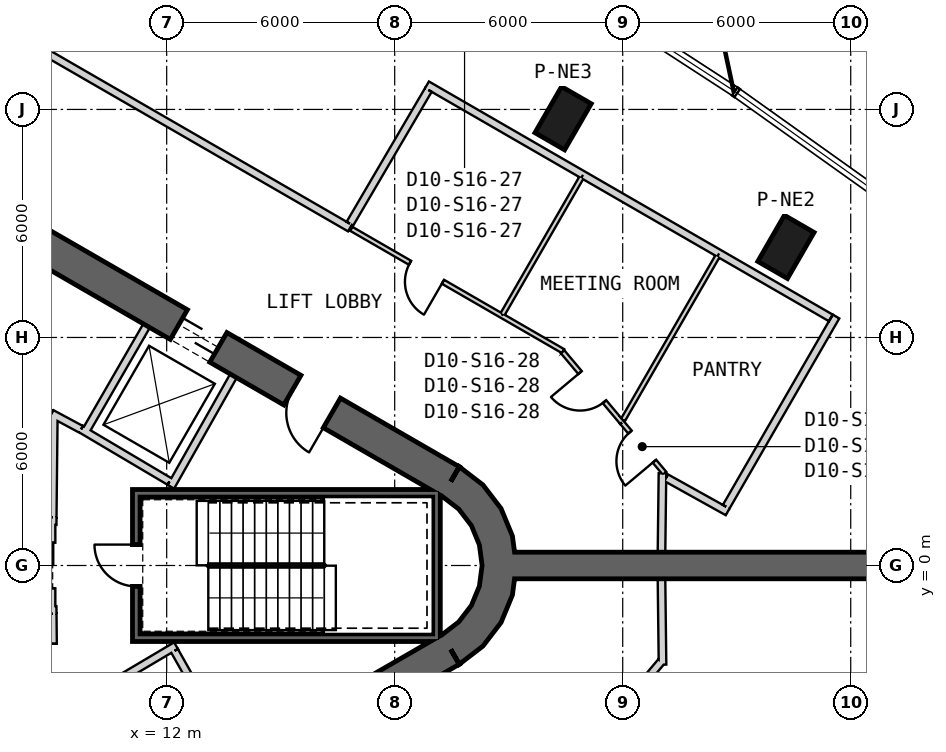
"""IFC4 building model, lengths in metres.
Left out: names, types, materials, properties, quantities, classifications, styles, units other than length and angle.
Written with IfcOpenShell. Run it as: python <this file> out.ifc"""

import sys

from ifc_helpers import new_model, si_unit, direction, frame, frame_2d, origin, origin_2d, place, context, subcontext, project, spatial, polyline, rectangle, outline, extrude, element, fill, save


model = new_model("IFC4")
c1 = context("Model", 3, precision=1e-05, world=origin(), true_north=direction((0.0, 1.0)))
c2 = subcontext(c1, "Body", "Model", "MODEL_VIEW")
j1 = project(units=[si_unit("LENGTHUNIT", "METRE"), si_unit("PLANEANGLEUNIT", "RADIAN")], contexts=[c1])
p1 = place(None, origin())
s1 = spatial("IfcSite", under=j1, at=p1, CompositionType="ELEMENT")
p2 = place(p1, origin())
s2 = spatial("IfcBuilding", under=s1, at=p2, CompositionType="ELEMENT")
p3 = place(p2, frame((0.0, 0.0, 253.2)))
s3 = spatial("IfcBuildingStorey", under=s2, at=p3, CompositionType="ELEMENT", Elevation=253.2)
for number, where, z_axis, x_axis in (
    (1, (28.295, 8.383, 0.0), (0.0, 0.0, 1.0), (0.5, 0.866, 0.0)),
    (2, (22.431, 11.768, 0.0), (0.0, 0.0, 1.0), (0.5, 0.866, 0.0)),
):
    element("IfcColumn", number, at=place(p3, frame(where, z_axis=z_axis, x_axis=x_axis)), inside=s3, PredefinedType="COLUMN", context=c2, shape_type="SweptSolid", body=[
        extrude(rectangle(XDim=1.4, YDim=0.9, at=origin_2d()), origin(), (0.0, 0.0, 1.0), 4.0),
    ])
p4 = place(p3, frame((19.475, 2.208, 0.0), z_axis=(0.0, 0.0, 1.0), x_axis=(-0.866028369851, 0.499994862586, 0.0)))
e3 = element("IfcWall", 3, at=p4, inside=s3, PredefinedType="SHEAR", context=c2, shape_type="SweptSolid", body=[
    extrude(rectangle(XDim=31.523, YDim=0.9, at=frame_2d((15.762, 0.0))), origin(), (0.0, 0.0, 1.0), 4.0),
])
p5 = place(p4, frame((7.062, 0.0, 0.0)))
e4 = element("IfcOpeningElement", 4, at=p5, cuts=e3, PredefinedType="OPENING", context=c2, shape_type="SweptSolid", body=[
    extrude(rectangle(XDim=1.2, YDim=2.4, at=frame_2d((0.6, 1.2))), frame((0.0, 0.46, 0.0), z_axis=(0.0, -1.0, 0.0), x_axis=(1.0, 0.0, 0.0)), (0.0, 0.0, 1.0), 0.92),
])
p6 = place(p4, frame((3.612, 0.0, 0.0)))
e5 = element("IfcOpeningElement", 5, at=p6, cuts=e3, PredefinedType="OPENING", context=c2, shape_type="SweptSolid", body=[
    extrude(rectangle(XDim=1.2, YDim=2.4, at=frame_2d((0.6, 1.2))), frame((0.0, 0.46, 0.0), z_axis=(0.0, -1.0, 0.0), x_axis=(1.0, 0.0, 0.0)), (0.0, 0.0, 1.0), 0.92),
])
p7 = place(p4, frame((26.712, 0.0, 0.0)))
e6 = element("IfcOpeningElement", 6, at=p7, cuts=e3, PredefinedType="OPENING", context=c2, shape_type="SweptSolid", body=[
    extrude(rectangle(XDim=1.2, YDim=2.4, at=frame_2d((0.6, 1.2))), frame((0.0, 0.46, 0.0), z_axis=(0.0, -1.0, 0.0), x_axis=(1.0, 0.0, 0.0)), (0.0, 0.0, 1.0), 0.92),
])
p8 = place(p3, frame((-7.825, -17.97, 0.0), z_axis=(0.0, 0.0, 1.0), x_axis=(0.866028369851, 0.499994862586, 0.0)))
e7 = element("IfcWall", 7, at=p8, inside=s3, PredefinedType="SHEAR", context=c2, shape_type="SweptSolid", body=[
    extrude(rectangle(XDim=31.523, YDim=0.9, at=frame_2d((15.762, 0.0))), origin(), (0.0, 0.0, 1.0), 4.0),
])
p9 = place(p8, frame((7.062, 0.0, 0.0)))
e8 = element("IfcOpeningElement", 8, at=p9, cuts=e7, PredefinedType="OPENING", context=c2, shape_type="SweptSolid", body=[
    extrude(rectangle(XDim=1.2, YDim=2.4, at=frame_2d((0.6, 1.2))), frame((0.0, 0.46, 0.0), z_axis=(0.0, -1.0, 0.0), x_axis=(1.0, 0.0, 0.0)), (0.0, 0.0, 1.0), 0.92),
])
p10 = place(p8, frame((9.762, 0.0, 0.0)))
e9 = element("IfcOpeningElement", 9, at=p10, cuts=e7, PredefinedType="OPENING", context=c2, shape_type="SweptSolid", body=[
    extrude(rectangle(XDim=1.2, YDim=2.4, at=frame_2d((0.6, 1.2))), frame((0.0, 0.46, 0.0), z_axis=(0.0, -1.0, 0.0), x_axis=(1.0, 0.0, 0.0)), (0.0, 0.0, 1.0), 0.92),
])
p11 = place(p8, frame((12.462, 0.0, 0.0)))
e10 = element("IfcOpeningElement", 10, at=p11, cuts=e7, PredefinedType="OPENING", context=c2, shape_type="SweptSolid", body=[
    extrude(rectangle(XDim=1.2, YDim=2.4, at=frame_2d((0.6, 1.2))), frame((0.0, 0.46, 0.0), z_axis=(0.0, -1.0, 0.0), x_axis=(1.0, 0.0, 0.0)), (0.0, 0.0, 1.0), 0.92),
])
p12 = place(p8, frame((15.162, 0.0, 0.0)))
e11 = element("IfcOpeningElement", 11, at=p12, cuts=e7, PredefinedType="OPENING", context=c2, shape_type="SweptSolid", body=[
    extrude(rectangle(XDim=1.2, YDim=2.4, at=frame_2d((0.6, 1.2))), frame((0.0, 0.46, 0.0), z_axis=(0.0, -1.0, 0.0), x_axis=(1.0, 0.0, 0.0)), (0.0, 0.0, 1.0), 0.92),
])
p13 = place(p8, frame((17.862, 0.0, 0.0)))
e12 = element("IfcOpeningElement", 12, at=p13, cuts=e7, PredefinedType="OPENING", context=c2, shape_type="SweptSolid", body=[
    extrude(rectangle(XDim=1.2, YDim=2.4, at=frame_2d((0.6, 1.2))), frame((0.0, 0.46, 0.0), z_axis=(0.0, -1.0, 0.0), x_axis=(1.0, 0.0, 0.0)), (0.0, 0.0, 1.0), 0.92),
])
p14 = place(p8, frame((20.562, 0.0, 0.0)))
e13 = element("IfcOpeningElement", 13, at=p14, cuts=e7, PredefinedType="OPENING", context=c2, shape_type="SweptSolid", body=[
    extrude(rectangle(XDim=1.2, YDim=2.4, at=frame_2d((0.6, 1.2))), frame((0.0, 0.46, 0.0), z_axis=(0.0, -1.0, 0.0), x_axis=(1.0, 0.0, 0.0)), (0.0, 0.0, 1.0), 0.92),
])
p15 = place(p8, frame((26.712, 0.0, 0.0)))
e14 = element("IfcOpeningElement", 14, at=p15, cuts=e7, PredefinedType="OPENING", context=c2, shape_type="SweptSolid", body=[
    extrude(rectangle(XDim=1.2, YDim=2.4, at=frame_2d((0.6, 1.2))), frame((0.0, 0.46, 0.0), z_axis=(0.0, -1.0, 0.0), x_axis=(1.0, 0.0, 0.0)), (0.0, 0.0, 1.0), 0.92),
])
p16 = place(p8, frame((3.612, 0.0, 0.0)))
e15 = element("IfcOpeningElement", 15, at=p16, cuts=e7, PredefinedType="OPENING", context=c2, shape_type="SweptSolid", body=[
    extrude(rectangle(XDim=1.2, YDim=2.4, at=frame_2d((0.6, 1.2))), frame((0.0, 0.46, 0.0), z_axis=(0.0, -1.0, 0.0), x_axis=(1.0, 0.0, 0.0)), (0.0, 0.0, 1.0), 0.92),
])
p17 = place(p3, origin())
e16 = element("IfcWall", 16, at=p17, inside=s3, PredefinedType="SHEAR", context=c2, shape_type="SweptSolid", body=[
    extrude(outline(polyline([(19.7, -2.598), (20.321, -2.121), (20.798, -1.5), (21.098, -0.777), (21.2, 0.0), (21.098, 0.777), (20.798, 1.5), (20.321, 2.121), (19.7, 2.598), (19.25, 1.819), (19.685, 1.485), (20.019, 1.05), (20.229, 0.543), (20.3, 0.0), (20.229, -0.543), (20.019, -1.05), (19.685, -1.485), (19.25, -1.819), (19.7, -2.598)])), origin(), (0.0, 0.0, 1.0), 4.0),
])
p18 = place(p3, frame((21.15, 0.0, 0.0), z_axis=(0.0, 0.0, 1.0), x_axis=(1.0, 0.0, 0.0)))
e17 = element("IfcWall", 17, at=p18, inside=s3, PredefinedType="SHEAR", context=c2, shape_type="SweptSolid", body=[
    extrude(rectangle(XDim=10.433, YDim=0.7, at=frame_2d((5.216, 0.0))), origin(), (0.0, 0.0, 1.0), 4.0),
])
p19 = place(p3, frame((9.847, 3.495, 0.0), z_axis=(0.0, 0.0, 1.0), x_axis=(0.499984717929, 0.866034226713, 0.0)))
e18 = element("IfcWall", 18, at=p19, inside=s3, PredefinedType="PLUMBINGWALL", context=c2, shape_type="SweptSolid", body=[
    extrude(rectangle(XDim=3.25, YDim=0.2, at=frame_2d((1.625, 0.0))), origin(), (0.0, 0.0, 1.0), 3.7),
])
p20 = place(p3, frame((12.11, 2.073, 0.0), z_axis=(0.0, 0.0, 1.0), x_axis=(0.49196600604, 0.870614408852, 0.0)))
e19 = element("IfcWall", 19, at=p20, inside=s3, PredefinedType="PLUMBINGWALL", context=c2, shape_type="SweptSolid", body=[
    extrude(rectangle(XDim=3.35, YDim=0.2, at=frame_2d((1.675, 0.0))), origin(), (0.0, 0.0, 1.0), 3.7),
])
p21 = place(p3, frame((12.073, 2.211, 0.0), z_axis=(0.0, 0.0, 1.0), x_axis=(-0.860414880418, 0.509594185166, 0.0)))
e20 = element("IfcWall", 20, at=p21, inside=s3, PredefinedType="PLUMBINGWALL", context=c2, shape_type="SweptSolid", body=[
    extrude(rectangle(XDim=2.7, YDim=0.2, at=frame_2d((1.35, 0.0))), origin(), (0.0, 0.0, 1.0), 3.7),
])
p22 = place(p3, frame((19.2, 1.9, -0.3), z_axis=(0.0, 0.0, 1.0), x_axis=(-1.0, 0.0, 0.0)))
e21 = element("IfcWall", 21, at=p22, inside=s3, PredefinedType="SHEAR", context=c2, shape_type="SweptSolid", body=[
    extrude(rectangle(XDim=8.1, YDim=0.2, at=frame_2d((4.05, 0.0))), origin(), (0.0, 0.0, 1.0), 4.0),
])
p23 = place(p3, frame((19.1, -2.0, -0.3), z_axis=(0.0, 0.0, 1.0), x_axis=(0.0, 1.0, 0.0)))
e22 = element("IfcWall", 22, at=p23, inside=s3, PredefinedType="SHEAR", context=c2, shape_type="SweptSolid", body=[
    extrude(rectangle(XDim=3.8, YDim=0.2, at=frame_2d((1.9, 0.0))), origin(), (0.0, 0.0, 1.0), 4.0),
])
p24 = place(p3, frame((11.1, -1.9, -0.3), z_axis=(0.0, 0.0, 1.0), x_axis=(1.0, 0.0, 0.0)))
e23 = element("IfcWall", 23, at=p24, inside=s3, PredefinedType="SHEAR", context=c2, shape_type="SweptSolid", body=[
    extrude(rectangle(XDim=7.9, YDim=0.2, at=frame_2d((3.95, 0.0))), origin(), (0.0, 0.0, 1.0), 4.0),
])
p25 = place(p3, frame((11.2, -1.8, -0.3), z_axis=(0.0, 0.0, 1.0), x_axis=(0.0, 1.0, 0.0)))
e24 = element("IfcWall", 24, at=p25, inside=s3, PredefinedType="SHEAR", context=c2, shape_type="SweptSolid", body=[
    extrude(rectangle(XDim=3.6, YDim=0.2, at=frame_2d((1.8, 0.0))), origin(), (0.0, 0.0, 1.0), 4.0),
])
p26 = place(p25, frame((1.25, 0.0, 0.3)))
e25 = element("IfcOpeningElement", 25, at=p26, cuts=e24, PredefinedType="OPENING", context=c2, shape_type="SweptSolid", body=[
    extrude(rectangle(XDim=1.1, YDim=2.1, at=frame_2d((0.55, 1.05))), frame((0.0, 0.11, 0.0), z_axis=(0.0, -1.0, 0.0), x_axis=(1.0, 0.0, 0.0)), (0.0, 0.0, 1.0), 0.22),
])
p27 = place(p3, frame((8.97, 1.2, 0.0), z_axis=(0.0, 0.0, 1.0), x_axis=(0.0, -1.0, 0.0)))
e26 = element("IfcWall", 26, at=p27, inside=s3, PredefinedType="PLUMBINGWALL", context=c2, shape_type="SweptSolid", body=[
    extrude(rectangle(XDim=2.4, YDim=0.2, at=frame_2d((1.2, 0.0))), origin(), (0.0, 0.0, 1.0), 3.7),
])
p28 = place(p27, frame((0.6, 0.0, 0.0)))
e27 = element("IfcOpeningElement", 27, at=p28, cuts=e26, PredefinedType="OPENING", context=c2, shape_type="SweptSolid", body=[
    extrude(rectangle(XDim=1.2, YDim=2.4, at=frame_2d((0.6, 1.2))), frame((0.0, 0.11, 0.0), z_axis=(0.0, -1.0, 0.0), x_axis=(1.0, 0.0, 0.0)), (0.0, 0.0, 1.0), 0.22),
])
p29 = place(p3, frame((6.0, 1.2, 0.0), z_axis=(0.0, 0.0, 1.0), x_axis=(0.999949988, -0.010001074852, 0.0)))
e28 = element("IfcWall", 28, at=p29, inside=s3, PredefinedType="PLUMBINGWALL", context=c2, shape_type="SweptSolid", body=[
    extrude(rectangle(XDim=3.1, YDim=0.2, at=frame_2d((1.55, 0.0))), origin(), (0.0, 0.0, 1.0), 3.7),
])
p30 = place(p3, frame((5.9, -1.201, 0.0), z_axis=(0.0, 0.0, 1.0), x_axis=(0.999950064753, 0.009993397809, 0.0)))
e29 = element("IfcWall", 29, at=p30, inside=s3, PredefinedType="PLUMBINGWALL", context=c2, shape_type="SweptSolid", body=[
    extrude(rectangle(XDim=3.2, YDim=0.2, at=frame_2d((1.6, 0.0))), origin(), (0.0, 0.0, 1.0), 3.7),
])
p31 = place(p3, frame((8.974, 3.999, 0.0), z_axis=(0.0, 0.0, 1.0), x_axis=(0.880917147855, -0.473270513147, 0.0)))
e30 = element("IfcWall", 30, at=p31, inside=s3, PredefinedType="PARTITIONING", context=c2, shape_type="SweptSolid", body=[
    extrude(rectangle(XDim=0.878, YDim=0.2, at=frame_2d((0.439, 0.0))), origin(), (0.0, 0.0, 1.0), 3.7),
])
p32 = place(p3, frame((12.245, -2.109, 0.0), z_axis=(0.0, 0.0, 1.0), x_axis=(-0.860414880418, -0.509594185166, 0.0)))
e31 = element("IfcWall", 31, at=p32, inside=s3, PredefinedType="PARTITIONING", context=c2, shape_type="SweptSolid", body=[
    extrude(rectangle(XDim=2.7, YDim=0.2, at=frame_2d((1.35, 0.0))), origin(), (0.0, 0.0, 1.0), 3.7),
])
p33 = place(p3, frame((13.758, -4.99, 0.0), z_axis=(0.0, 0.0, 1.0), x_axis=(-0.491993409184, 0.87059892334, 0.0)))
e32 = element("IfcWall", 32, at=p33, inside=s3, PredefinedType="PARTITIONING", context=c2, shape_type="SweptSolid", body=[
    extrude(rectangle(XDim=3.15, YDim=0.2, at=frame_2d((1.575, 0.0))), origin(), (0.0, 0.0, 1.0), 3.7),
])
p34 = place(p33, frame((1.175, 0.0, 0.0)))
e33 = element("IfcOpeningElement", 33, at=p34, cuts=e32, PredefinedType="OPENING", context=c2, shape_type="SweptSolid", body=[
    extrude(rectangle(XDim=0.8, YDim=2.1, at=frame_2d((0.4, 1.05))), frame((0.0, 0.11, 0.0), z_axis=(0.0, -1.0, 0.0), x_axis=(1.0, 0.0, 0.0)), (0.0, 0.0, 1.0), 0.22),
])
p35 = place(p3, frame((9.001, 1.27, 0.0), z_axis=(0.0, 0.0, 1.0), x_axis=(0.01074821465, 0.999942236273, 0.0)))
e34 = element("IfcWall", 34, at=p35, inside=s3, PredefinedType="PARTITIONING", context=c2, shape_type="SweptSolid", body=[
    extrude(rectangle(XDim=2.726, YDim=0.2, at=frame_2d((1.363, 0.0))), origin(), (0.0, 0.0, 1.0), 3.7),
])
p36 = place(p3, frame((9.029, -3.851, 0.0), z_axis=(0.0, 0.0, 1.0), x_axis=(-0.010783593937, 0.99994185536, 0.0)))
e35 = element("IfcWall", 35, at=p36, inside=s3, PredefinedType="PARTITIONING", context=c2, shape_type="SweptSolid", body=[
    extrude(rectangle(XDim=2.581, YDim=0.2, at=frame_2d((1.291, 0.0))), origin(), (0.0, 0.0, 1.0), 3.7),
])
p37 = place(p36, frame((0.791, 0.0, 0.0)))
e36 = element("IfcOpeningElement", 36, at=p37, cuts=e35, PredefinedType="OPENING", context=c2, shape_type="SweptSolid", body=[
    extrude(rectangle(XDim=1.0, YDim=2.1, at=frame_2d((0.5, 1.05))), frame((0.0, 0.11, 0.0), z_axis=(0.0, -1.0, 0.0), x_axis=(1.0, 0.0, 0.0)), (0.0, 0.0, 1.0), 0.22),
])
p38 = place(p3, frame((22.431, 5.64, 0.0), z_axis=(0.0, 0.0, 1.0), x_axis=(-0.866019968675, 0.500009413767, 0.0)))
e37 = element("IfcWall", 37, at=p38, inside=s3, PredefinedType="PARTITIONING", context=c2, shape_type="SweptSolid", body=[
    extrude(rectangle(XDim=1.866, YDim=0.12, at=frame_2d((0.933, 0.0))), origin(), (0.0, 0.0, 1.0), 2.98),
])
p39 = place(p3, frame((20.816, 6.573, 0.0), z_axis=(0.0, 0.0, 1.0), x_axis=(-0.866038816861, 0.499976767151, 0.0)))
e38 = element("IfcWall", 38, at=p39, inside=s3, PredefinedType="PARTITIONING", context=c2, shape_type="SweptSolid", body=[
    extrude(rectangle(XDim=4.571, YDim=0.12, at=frame_2d((2.285, 0.0))), origin(), (0.0, 0.0, 1.0), 2.98),
])
p40 = place(p39, frame((1.785, 0.0, 0.0)))
e39 = element("IfcOpeningElement", 39, at=p40, cuts=e38, PredefinedType="OPENING", context=c2, shape_type="SweptSolid", body=[
    extrude(rectangle(XDim=1.0, YDim=2.1, at=frame_2d((0.5, 1.05))), frame((0.0, 0.07, 0.0), z_axis=(0.0, -1.0, 0.0), x_axis=(1.0, 0.0, 0.0)), (0.0, 0.0, 1.0), 0.14),
])
p41 = place(p3, frame((16.823, 8.878, 0.0), z_axis=(0.0, 0.0, 1.0), x_axis=(-0.866020355572, 0.500008743658, 0.0)))
e40 = element("IfcWall", 40, at=p41, inside=s3, PredefinedType="PARTITIONING", context=c2, shape_type="SweptSolid", body=[
    extrude(rectangle(XDim=12.18, YDim=0.2, at=frame_2d((6.09, 0.0))), origin(), (0.0, 0.0, 1.0), 2.98),
])
p42 = place(p3, frame((25.021, 0.35, 0.0), z_axis=(0.0, 0.0, 1.0), x_axis=(0.012334587904, 0.999923926077, 0.0)))
e41 = element("IfcWall", 41, at=p42, inside=s3, PredefinedType="PARTITIONING", context=c2, shape_type="SweptSolid", body=[
    extrude(rectangle(XDim=2.078, YDim=0.2, at=frame_2d((1.039, 0.0))), origin(), (0.0, 0.0, 1.0), 3.7),
])
p43 = place(p3, frame((25.1, 2.427, 0.0), z_axis=(0.0, 0.0, 1.0), x_axis=(-0.642728930344, 0.766093677104, 0.0)))
e42 = element("IfcWall", 42, at=p43, inside=s3, PredefinedType="PARTITIONING", context=c2, shape_type="SweptSolid", body=[
    extrude(rectangle(XDim=1.743, YDim=0.12, at=frame_2d((0.872, 0.0))), origin(), (0.0, 0.0, 1.0), 2.88),
])
p44 = place(p43, frame((0.414, 0.0, 0.0)))
e43 = element("IfcOpeningElement", 43, at=p44, cuts=e42, PredefinedType="OPENING", context=c2, shape_type="SweptSolid", body=[
    extrude(rectangle(XDim=1.0, YDim=2.1, at=frame_2d((0.5, 1.05))), frame((0.0, 0.07, 0.0), z_axis=(0.0, -1.0, 0.0), x_axis=(1.0, 0.0, 0.0)), (0.0, 0.0, 1.0), 0.14),
])
p45 = place(p3, frame((23.979, 3.763, 0.0), z_axis=(0.0, 0.0, 1.0), x_axis=(-0.642800687269, 0.766033469535, 0.0)))
e44 = element("IfcWall", 44, at=p45, inside=s3, PredefinedType="PARTITIONING", context=c2, shape_type="SweptSolid", body=[
    extrude(rectangle(XDim=2.429, YDim=0.12, at=frame_2d((1.214, 0.0))), origin(), (0.0, 0.0, 1.0), 3.7),
])
p46 = place(p45, frame((0.715, 0.0, 0.0)))
e45 = element("IfcOpeningElement", 45, at=p46, cuts=e44, PredefinedType="OPENING", context=c2, shape_type="SweptSolid", body=[
    extrude(rectangle(XDim=1.0, YDim=2.1, at=frame_2d((0.5, 1.05))), frame((0.0, 0.07, 0.0), z_axis=(0.0, -1.0, 0.0), x_axis=(1.0, 0.0, 0.0)), (0.0, 0.0, 1.0), 0.14),
])
p47 = place(p3, frame((25.048, -2.608, 0.0), z_axis=(0.0, 0.0, 1.0), x_axis=(-0.012000433251, 0.999927992208, 0.0)))
e46 = element("IfcWall", 46, at=p47, inside=s3, PredefinedType="PARTITIONING", context=c2, shape_type="SweptSolid", body=[
    extrude(rectangle(XDim=2.258, YDim=0.2, at=frame_2d((1.129, 0.0))), origin(), (0.0, 0.0, 1.0), 3.7),
])
p48 = place(p3, frame((22.315, -5.746, 0.0), z_axis=(0.0, 0.0, 1.0), x_axis=(0.642828004621, 0.76601054593, 0.0)))
e47 = element("IfcWall", 47, at=p48, inside=s3, PredefinedType="PARTITIONING", context=c2, shape_type="SweptSolid", body=[
    extrude(rectangle(XDim=4.2, YDim=0.2, at=frame_2d((2.1, 0.0))), origin(), (0.0, 0.0, 1.0), 2.88),
])
p49 = place(p3, frame((18.85, 12.65, 0.0), z_axis=(0.0, 0.0, 1.0), x_axis=(0.866019207135, -0.500010732759, 0.0)))
e48 = element("IfcWall", 48, at=p49, inside=s3, PredefinedType="PARTITIONING", context=c2, shape_type="SweptSolid", body=[
    extrude(rectangle(XDim=4.741, YDim=0.2, at=frame_2d((2.37, 0.0))), origin(), (0.0, 0.0, 1.0), 2.98),
])
p50 = place(p3, frame((22.956, 10.279, 0.0), z_axis=(0.0, 0.0, 1.0), x_axis=(0.86601450623, -0.500018874643, 0.0)))
e49 = element("IfcWall", 49, at=p50, inside=s3, PredefinedType="PARTITIONING", context=c2, shape_type="SweptSolid", body=[
    extrude(rectangle(XDim=4.135, YDim=0.2, at=frame_2d((2.067, 0.0))), origin(), (0.0, 0.0, 1.0), 3.7),
])
p51 = place(p3, frame((26.537, 8.212, 0.0), z_axis=(0.0, 0.0, 1.0), x_axis=(0.866034661658, -0.49998396455, 0.0)))
e50 = element("IfcWall", 50, at=p51, inside=s3, PredefinedType="PARTITIONING", context=c2, shape_type="SweptSolid", body=[
    extrude(rectangle(XDim=3.394, YDim=0.2, at=frame_2d((1.697, 0.0))), origin(), (0.0, 0.0, 1.0), 2.98),
])
p52 = place(p3, frame((18.886, 12.513, 0.0), z_axis=(0.0, 0.0, 1.0), x_axis=(-0.506023514177, -0.862519682732, 0.0)))
e51 = element("IfcWall", 51, at=p52, inside=s3, PredefinedType="PARTITIONING", context=c2, shape_type="SweptSolid", body=[
    extrude(rectangle(XDim=4.08, YDim=0.2, at=frame_2d((2.04, 0.0))), origin(), (0.0, 0.0, 1.0), 2.98),
])
p53 = place(p3, frame((25.146, 2.308, 0.0), z_axis=(0.0, 0.0, 1.0), x_axis=(0.873988954693, -0.485945786147, 0.0)))
e52 = element("IfcWall", 52, at=p53, inside=s3, PredefinedType="PARTITIONING", context=c2, shape_type="SweptSolid", body=[
    extrude(rectangle(XDim=1.848, YDim=0.2, at=frame_2d((0.924, 0.0))), origin(), (0.0, 0.0, 1.0), 3.7),
])
p54 = place(p3, frame((26.723, 1.546, 0.0), z_axis=(0.0, 0.0, 1.0), x_axis=(0.500018609004, 0.866014659605, 0.0)))
e53 = element("IfcWall", 53, at=p54, inside=s3, PredefinedType="PARTITIONING", context=c2, shape_type="SweptSolid", body=[
    extrude(rectangle(XDim=5.78, YDim=0.2, at=frame_2d((2.89, 0.0))), origin(), (0.0, 0.0, 1.0), 2.88),
])
p55 = place(p3, frame((20.846, 6.625, 0.0), z_axis=(0.0, 0.0, 1.0), x_axis=(0.50002680699, 0.866009926209, 0.0)))
e54 = element("IfcWall", 54, at=p55, inside=s3, PredefinedType="PARTITIONING", context=c2, shape_type="SweptSolid", body=[
    extrude(rectangle(XDim=4.12, YDim=0.12, at=frame_2d((2.06, 0.0))), origin(), (0.0, 0.0, 1.0), 3.7),
])
p56 = place(p3, frame((26.487, 8.125, 0.0), z_axis=(0.0, 0.0, 1.0), x_axis=(-0.500037493495, -0.866003755823, 0.0)))
e55 = element("IfcWall", 55, at=p56, inside=s3, PredefinedType="PARTITIONING", context=c2, shape_type="SweptSolid", body=[
    extrude(rectangle(XDim=4.964, YDim=0.12, at=frame_2d((2.482, 0.0))), origin(), (0.0, 0.0, 1.0), 2.98),
])
p57 = place(p26, origin())
e56 = element("IfcDoor", 56, at=p57, inside=s3, OperationType="SINGLE_SWING_LEFT", PredefinedType="USERDEFINED", context=c2, shape_type="SweptSolid", body=[
    extrude(rectangle(XDim=1.1, YDim=2.1, at=frame_2d((0.55, 1.05))), frame((0.0, 0.025, 0.0), z_axis=(0.0, -1.0, 0.0), x_axis=(1.0, 0.0, 0.0)), (0.0, 0.0, 1.0), 0.05),
])
fill(e25, e56)
p58 = place(p37, origin())
e57 = element("IfcDoor", 57, at=p58, inside=s3, OperationType="SINGLE_SWING_RIGHT", PredefinedType="USERDEFINED", context=c2, shape_type="SweptSolid", body=[
    extrude(rectangle(XDim=1.0, YDim=2.1, at=frame_2d((0.5, 1.05))), frame((0.0, 0.025, 0.0), z_axis=(0.0, -1.0, 0.0), x_axis=(1.0, 0.0, 0.0)), (0.0, 0.0, 1.0), 0.05),
])
fill(e36, e57)
p59 = place(p40, origin())
e58 = element("IfcDoor", 58, at=p59, inside=s3, OperationType="SINGLE_SWING_LEFT", PredefinedType="NOTDEFINED", context=c2, shape_type="SweptSolid", body=[
    extrude(rectangle(XDim=1.0, YDim=2.1, at=frame_2d((0.5, 1.05))), frame((0.0, 0.025, 0.0), z_axis=(0.0, -1.0, 0.0), x_axis=(1.0, 0.0, 0.0)), (0.0, 0.0, 1.0), 0.05),
])
fill(e39, e58)
p60 = place(p46, origin())
e59 = element("IfcDoor", 59, at=p60, inside=s3, OperationType="SINGLE_SWING_RIGHT", PredefinedType="NOTDEFINED", context=c2, shape_type="SweptSolid", body=[
    extrude(rectangle(XDim=1.0, YDim=2.1, at=frame_2d((0.5, 1.05))), frame((0.0, 0.025, 0.0), z_axis=(0.0, -1.0, 0.0), x_axis=(1.0, 0.0, 0.0)), (0.0, 0.0, 1.0), 0.05),
])
fill(e45, e59)
p61 = place(p44, origin())
e60 = element("IfcDoor", 60, at=p61, inside=s3, OperationType="SINGLE_SWING_LEFT", PredefinedType="NOTDEFINED", context=c2, shape_type="SweptSolid", body=[
    extrude(rectangle(XDim=1.0, YDim=2.1, at=frame_2d((0.5, 1.05))), frame((0.0, 0.025, 0.0), z_axis=(0.0, -1.0, 0.0), x_axis=(1.0, 0.0, 0.0)), (0.0, 0.0, 1.0), 0.05),
])
fill(e43, e60)
p62 = place(p5, origin())
e61 = element("IfcDoor", 61, at=p62, inside=s3, OperationType="SLIDING_TO_LEFT", PredefinedType="USERDEFINED", context=c2, shape_type="SweptSolid", body=[
    extrude(rectangle(XDim=1.2, YDim=2.4, at=frame_2d((0.6, 1.2))), frame((0.0, 0.025, 0.0), z_axis=(0.0, -1.0, 0.0), x_axis=(1.0, 0.0, 0.0)), (0.0, 0.0, 1.0), 0.05),
])
fill(e4, e61)
p63 = place(p6, origin())
e62 = element("IfcDoor", 62, at=p63, inside=s3, OperationType="SINGLE_SWING_RIGHT", PredefinedType="USERDEFINED", context=c2, shape_type="SweptSolid", body=[
    extrude(rectangle(XDim=1.2, YDim=2.4, at=frame_2d((0.6, 1.2))), frame((0.0, 0.025, 0.0), z_axis=(0.0, -1.0, 0.0), x_axis=(1.0, 0.0, 0.0)), (0.0, 0.0, 1.0), 0.05),
])
fill(e5, e62)
save(model, sys.argv[1])
